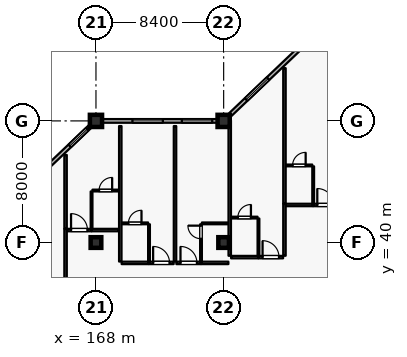
"""IFC4 building model, lengths in metres.
Left out: names, types, materials, properties, quantities, classifications, styles, units other than length and angle.
Written with IfcOpenShell. Run it as: python <this file> out.ifc"""

import sys

from ifc_helpers import new_model, si_unit, direction, frame, frame_2d, origin, origin_2d, place, context, subcontext, project, spatial, rectangle, extrude, element, fill, save


model = new_model("IFC4")
c1 = context("Model", 3, precision=1e-05, world=origin(), true_north=direction((0.0, 1.0)))
c2 = subcontext(c1, "Body", "Model", "MODEL_VIEW")
j1 = project(units=[si_unit("LENGTHUNIT", "METRE"), si_unit("PLANEANGLEUNIT", "RADIAN")], contexts=[c1])
p1 = place(None, origin())
s1 = spatial("IfcSite", under=j1, at=p1, CompositionType="ELEMENT")
p2 = place(p1, origin())
s2 = spatial("IfcBuilding", under=s1, at=p2, CompositionType="ELEMENT")
p3 = place(p2, frame((0.0, 0.0, 25.2)))
s3 = spatial("IfcBuildingStorey", under=s2, at=p3, CompositionType="ELEMENT", Elevation=25.2)
for number, where, z_axis, x_axis in (
    (1, (168.0, 48.0, 0.0), (0.0, 0.0, 1.0), (1.0, 0.0, 0.0)),
    (2, (176.4, 48.0, 0.0), (0.0, 0.0, 1.0), (1.0, 0.0, 0.0)),
):
    element("IfcColumn", number, at=place(p3, frame(where, z_axis=z_axis, x_axis=x_axis)), inside=s3, PredefinedType="COLUMN", context=c2, shape_type="SweptSolid", body=[
        extrude(rectangle(XDim=0.8, YDim=0.8, at=origin_2d()), origin(), (0.0, 0.0, 1.0), 3.6),
    ])
for number, where, z_axis, x_axis in (
    (3, (168.0, 40.0, 0.0), (0.0, 0.0, 1.0), (1.0, 0.0, 0.0)),
    (4, (176.4, 40.0, 0.0), (0.0, 0.0, 1.0), (1.0, 0.0, 0.0)),
):
    element("IfcColumn", number, at=place(p3, frame(where, z_axis=z_axis, x_axis=x_axis)), inside=s3, PredefinedType="COLUMN", context=c2, shape_type="SweptSolid", body=[
        extrude(rectangle(XDim=0.7, YDim=0.7, at=origin_2d()), origin(), (0.0, 0.0, 1.0), 3.6),
    ])
p4 = place(p3, frame((160.0, 40.381, 0.0), z_axis=(0.0, 0.0, 1.0), x_axis=(0.724156739794, 0.689635422677, 0.0)))
e5 = element("IfcWall", 5, at=p4, inside=s3, PredefinedType="SOLIDWALL", context=c2, shape_type="SweptSolid", body=[
    extrude(rectangle(XDim=10.495, YDim=0.24, at=frame_2d((5.248, 0.0))), origin(), (0.0, 0.0, 1.0), 2.93),
])
p5 = place(p4, frame((0.926, 0.0, 0.8)))
e6 = element("IfcOpeningElement", 6, at=p5, cuts=e5, PredefinedType="OPENING", context=c2, shape_type="SweptSolid", body=[
    extrude(rectangle(XDim=1.6, YDim=1.6, at=frame_2d((0.8, 0.8))), frame((0.0, 0.13, 0.0), z_axis=(0.0, -1.0, 0.0), x_axis=(1.0, 0.0, 0.0)), (0.0, 0.0, 1.0), 0.26),
])
p6 = place(p4, frame((5.138, 0.0, 0.8)))
e7 = element("IfcOpeningElement", 7, at=p6, cuts=e5, PredefinedType="OPENING", context=c2, shape_type="SweptSolid", body=[
    extrude(rectangle(XDim=1.6, YDim=1.6, at=frame_2d((0.8, 0.8))), frame((0.0, 0.13, 0.0), z_axis=(0.0, -1.0, 0.0), x_axis=(1.0, 0.0, 0.0)), (0.0, 0.0, 1.0), 0.26),
])
p7 = place(p4, frame((8.659, 0.0, 0.8)))
e8 = element("IfcOpeningElement", 8, at=p7, cuts=e5, PredefinedType="OPENING", context=c2, shape_type="SweptSolid", body=[
    extrude(rectangle(XDim=1.6, YDim=1.6, at=frame_2d((0.8, 0.8))), frame((0.0, 0.13, 0.0), z_axis=(0.0, -1.0, 0.0), x_axis=(1.0, 0.0, 0.0)), (0.0, 0.0, 1.0), 0.26),
])
p8 = place(p3, frame((168.4, 48.0, 0.0), z_axis=(0.0, 0.0, 1.0), x_axis=(1.0, 0.0, 0.0)))
e9 = element("IfcWall", 9, at=p8, inside=s3, PredefinedType="SOLIDWALL", context=c2, shape_type="SweptSolid", body=[
    extrude(rectangle(XDim=7.6, YDim=0.24, at=frame_2d((3.8, 0.0))), origin(), (0.0, 0.0, 1.0), 2.89),
])
p9 = place(p8, frame((2.0, 0.0, 0.8)))
e10 = element("IfcOpeningElement", 10, at=p9, cuts=e9, PredefinedType="OPENING", context=c2, shape_type="SweptSolid", body=[
    extrude(rectangle(XDim=2.0, YDim=1.75, at=frame_2d((1.0, 0.875))), frame((0.0, 0.13, 0.0), z_axis=(0.0, -1.0, 0.0), x_axis=(1.0, 0.0, 0.0)), (0.0, 0.0, 1.0), 0.26),
])
p10 = place(p8, frame((5.25, 0.0, 0.8)))
e11 = element("IfcOpeningElement", 11, at=p10, cuts=e9, PredefinedType="OPENING", context=c2, shape_type="SweptSolid", body=[
    extrude(rectangle(XDim=2.0, YDim=1.75, at=frame_2d((1.0, 0.875))), frame((0.0, 0.13, 0.0), z_axis=(0.0, -1.0, 0.0), x_axis=(1.0, 0.0, 0.0)), (0.0, 0.0, 1.0), 0.26),
])
p11 = place(p3, frame((176.8, 48.381, 0.0), z_axis=(0.0, 0.0, 1.0), x_axis=(0.724145676014, 0.689647040094, 0.0)))
e12 = element("IfcWall", 12, at=p11, inside=s3, PredefinedType="SOLIDWALL", context=c2, shape_type="SweptSolid", body=[
    extrude(rectangle(XDim=10.495, YDim=0.24, at=frame_2d((5.248, 0.0))), origin(), (0.0, 0.0, 1.0), 2.89),
])
p12 = place(p11, frame((1.486, 0.0, 0.8)))
e13 = element("IfcOpeningElement", 13, at=p12, cuts=e12, PredefinedType="OPENING", context=c2, shape_type="SweptSolid", body=[
    extrude(rectangle(XDim=2.0, YDim=1.75, at=frame_2d((1.0, 0.875))), frame((0.0, 0.13, 0.0), z_axis=(0.0, -1.0, 0.0), x_axis=(1.0, 0.0, 0.0)), (0.0, 0.0, 1.0), 0.26),
])
p13 = place(p11, frame((6.457, 0.0, 0.8)))
e14 = element("IfcOpeningElement", 14, at=p13, cuts=e12, PredefinedType="OPENING", context=c2, shape_type="SweptSolid", body=[
    extrude(rectangle(XDim=2.0, YDim=1.75, at=frame_2d((1.0, 0.875))), frame((0.0, 0.13, 0.0), z_axis=(0.0, -1.0, 0.0), x_axis=(1.0, 0.0, 0.0)), (0.0, 0.0, 1.0), 0.26),
])
p14 = place(p3, frame((166.0, 32.26, 0.0), z_axis=(0.0, 0.0, 1.0), x_axis=(0.0, 1.0, 0.0)))
e15 = element("IfcWall", 15, at=p14, inside=s3, PredefinedType="PARTITIONING", context=c2, shape_type="SweptSolid", body=[
    extrude(rectangle(XDim=8.64, YDim=0.16, at=frame_2d((4.32, 0.0))), origin(), (0.0, 0.0, 1.0), 3.335),
])
p15 = place(p3, frame((166.09, 40.82, 0.0), z_axis=(0.0, 0.0, 1.0), x_axis=(1.0, 0.0, 0.0)))
e16 = element("IfcWall", 16, at=p15, inside=s3, PredefinedType="PARTITIONING", context=c2, shape_type="SweptSolid", body=[
    extrude(rectangle(XDim=1.62, YDim=0.16, at=frame_2d((0.81, 0.0))), origin(), (0.0, 0.0, 1.0), 3.335),
])
p16 = place(p15, frame((0.27, 0.0, 0.0)))
e17 = element("IfcOpeningElement", 17, at=p16, cuts=e16, PredefinedType="OPENING", context=c2, shape_type="SweptSolid", body=[
    extrude(rectangle(XDim=1.08, YDim=2.3, at=frame_2d((0.54, 1.15))), frame((0.0, 0.09, 0.0), z_axis=(0.0, -1.0, 0.0), x_axis=(1.0, 0.0, 0.0)), (0.0, 0.0, 1.0), 0.18),
])
p17 = place(p3, frame((167.72, 40.82, 0.0), z_axis=(0.0, 0.0, 1.0), x_axis=(1.0, 0.0, 0.0)))
e18 = element("IfcWall", 18, at=p17, inside=s3, PredefinedType="PARTITIONING", context=c2, shape_type="SweptSolid", body=[
    extrude(rectangle(XDim=1.79, YDim=0.16, at=frame_2d((0.895, 0.0))), origin(), (0.0, 0.0, 1.0), 3.335),
])
p18 = place(p3, frame((167.71, 40.91, 0.0), z_axis=(0.0, 0.0, 1.0), x_axis=(0.0, 1.0, 0.0)))
e19 = element("IfcWall", 19, at=p18, inside=s3, PredefinedType="PARTITIONING", context=c2, shape_type="SweptSolid", body=[
    extrude(rectangle(XDim=2.45, YDim=0.115, at=frame_2d((1.225, 0.0))), origin(), (0.0, 0.0, 1.0), 3.335),
])
p19 = place(p3, frame((167.77, 43.42, 0.0), z_axis=(0.0, 0.0, 1.0), x_axis=(1.0, 0.0, 0.0)))
e20 = element("IfcWall", 20, at=p19, inside=s3, PredefinedType="PARTITIONING", context=c2, shape_type="SweptSolid", body=[
    extrude(rectangle(XDim=1.73, YDim=0.115, at=frame_2d((0.865, 0.0))), origin(), (0.0, 0.0, 1.0), 3.335),
])
p20 = place(p19, frame((0.435, 0.0, 0.0)))
e21 = element("IfcOpeningElement", 21, at=p20, cuts=e20, PredefinedType="OPENING", context=c2, shape_type="SweptSolid", body=[
    extrude(rectangle(XDim=0.86, YDim=2.12, at=frame_2d((0.43, 1.06))), frame((0.0, 0.067, 0.0), z_axis=(0.0, -1.0, 0.0), x_axis=(1.0, 0.0, 0.0)), (0.0, 0.0, 1.0), 0.135),
])
p21 = place(p3, frame((166.0, 40.91, 0.0), z_axis=(0.0, 0.0, 1.0), x_axis=(0.0, 1.0, 0.0)))
e22 = element("IfcWall", 22, at=p21, inside=s3, PredefinedType="PARTITIONING", context=c2, shape_type="SweptSolid", body=[
    extrude(rectangle(XDim=4.85, YDim=0.16, at=frame_2d((2.425, 0.0))), origin(), (0.0, 0.0, 1.0), 3.335),
])
p22 = place(p3, frame((169.69, 38.66, 0.0), z_axis=(0.0, 0.0, 1.0), x_axis=(1.0, 0.0, 0.0)))
e23 = element("IfcWall", 23, at=p22, inside=s3, PredefinedType="PARTITIONING", context=c2, shape_type="SweptSolid", body=[
    extrude(rectangle(XDim=1.79, YDim=0.16, at=frame_2d((0.895, 0.0))), origin(), (0.0, 0.0, 1.0), 3.335),
])
p23 = place(p3, frame((171.49, 38.66, 0.0), z_axis=(0.0, 0.0, 1.0), x_axis=(1.0, 0.0, 0.0)))
e24 = element("IfcWall", 24, at=p23, inside=s3, PredefinedType="PARTITIONING", context=c2, shape_type="SweptSolid", body=[
    extrude(rectangle(XDim=1.62, YDim=0.16, at=frame_2d((0.81, 0.0))), origin(), (0.0, 0.0, 1.0), 3.335),
])
p24 = place(p23, frame((0.27, 0.0, 0.0)))
e25 = element("IfcOpeningElement", 25, at=p24, cuts=e24, PredefinedType="OPENING", context=c2, shape_type="SweptSolid", body=[
    extrude(rectangle(XDim=1.08, YDim=2.3, at=frame_2d((0.54, 1.15))), frame((0.0, 0.09, 0.0), z_axis=(0.0, -1.0, 0.0), x_axis=(1.0, 0.0, 0.0)), (0.0, 0.0, 1.0), 0.18),
])
p25 = place(p3, frame((171.49, 38.75, 0.0), z_axis=(0.0, 0.0, 1.0), x_axis=(0.0, 1.0, 0.0)))
e26 = element("IfcWall", 26, at=p25, inside=s3, PredefinedType="PARTITIONING", context=c2, shape_type="SweptSolid", body=[
    extrude(rectangle(XDim=2.45, YDim=0.115, at=frame_2d((1.225, 0.0))), origin(), (0.0, 0.0, 1.0), 3.335),
])
p26 = place(p3, frame((169.7, 41.26, 0.0), z_axis=(0.0, 0.0, 1.0), x_axis=(1.0, 0.0, 0.0)))
e27 = element("IfcWall", 27, at=p26, inside=s3, PredefinedType="PARTITIONING", context=c2, shape_type="SweptSolid", body=[
    extrude(rectangle(XDim=1.73, YDim=0.115, at=frame_2d((0.865, 0.0))), origin(), (0.0, 0.0, 1.0), 3.335),
])
p27 = place(p26, frame((0.435, 0.0, 0.0)))
e28 = element("IfcOpeningElement", 28, at=p27, cuts=e27, PredefinedType="OPENING", context=c2, shape_type="SweptSolid", body=[
    extrude(rectangle(XDim=0.86, YDim=2.12, at=frame_2d((0.43, 1.06))), frame((0.0, 0.067, 0.0), z_axis=(0.0, -1.0, 0.0), x_axis=(1.0, 0.0, 0.0)), (0.0, 0.0, 1.0), 0.135),
])
p28 = place(p3, frame((169.6, 38.75, 0.0), z_axis=(0.0, 0.0, 1.0), x_axis=(0.0, 1.0, 0.0)))
e29 = element("IfcWall", 29, at=p28, inside=s3, PredefinedType="PARTITIONING", context=c2, shape_type="SweptSolid", body=[
    extrude(rectangle(XDim=8.91, YDim=0.16, at=frame_2d((4.455, 0.0))), origin(), (0.0, 0.0, 1.0), 3.335),
])
p29 = place(p3, frame((173.29, 38.66, 0.0), z_axis=(0.0, 0.0, 1.0), x_axis=(1.0, 0.0, 0.0)))
e30 = element("IfcWall", 30, at=p29, inside=s3, PredefinedType="PARTITIONING", context=c2, shape_type="SweptSolid", body=[
    extrude(rectangle(XDim=1.62, YDim=0.16, at=frame_2d((0.81, 0.0))), origin(), (0.0, 0.0, 1.0), 3.335),
])
p30 = place(p29, frame((0.27, 0.0, 0.0)))
e31 = element("IfcOpeningElement", 31, at=p30, cuts=e30, PredefinedType="OPENING", context=c2, shape_type="SweptSolid", body=[
    extrude(rectangle(XDim=1.08, YDim=2.3, at=frame_2d((0.54, 1.15))), frame((0.0, 0.09, 0.0), z_axis=(0.0, -1.0, 0.0), x_axis=(1.0, 0.0, 0.0)), (0.0, 0.0, 1.0), 0.18),
])
p31 = place(p3, frame((174.92, 38.66, 0.0), z_axis=(0.0, 0.0, 1.0), x_axis=(1.0, 0.0, 0.0)))
e32 = element("IfcWall", 32, at=p31, inside=s3, PredefinedType="PARTITIONING", context=c2, shape_type="SweptSolid", body=[
    extrude(rectangle(XDim=1.79, YDim=0.16, at=frame_2d((0.895, 0.0))), origin(), (0.0, 0.0, 1.0), 3.335),
])
p32 = place(p3, frame((174.91, 38.75, 0.0), z_axis=(0.0, 0.0, 1.0), x_axis=(0.0, 1.0, 0.0)))
e33 = element("IfcWall", 33, at=p32, inside=s3, PredefinedType="PARTITIONING", context=c2, shape_type="SweptSolid", body=[
    extrude(rectangle(XDim=2.45, YDim=0.115, at=frame_2d((1.225, 0.0))), origin(), (0.0, 0.0, 1.0), 3.335),
])
p33 = place(p32, frame((1.5, 0.0, 0.0)))
e34 = element("IfcOpeningElement", 34, at=p33, cuts=e33, PredefinedType="OPENING", context=c2, shape_type="SweptSolid", body=[
    extrude(rectangle(XDim=0.86, YDim=2.12, at=frame_2d((0.43, 1.06))), frame((0.0, 0.067, 0.0), z_axis=(0.0, -1.0, 0.0), x_axis=(1.0, 0.0, 0.0)), (0.0, 0.0, 1.0), 0.135),
])
p34 = place(p3, frame((174.97, 41.26, 0.0), z_axis=(0.0, 0.0, 1.0), x_axis=(1.0, 0.0, 0.0)))
e35 = element("IfcWall", 35, at=p34, inside=s3, PredefinedType="PARTITIONING", context=c2, shape_type="SweptSolid", body=[
    extrude(rectangle(XDim=1.73, YDim=0.115, at=frame_2d((0.865, 0.0))), origin(), (0.0, 0.0, 1.0), 3.335),
])
p35 = place(p3, frame((173.2, 38.75, 0.0), z_axis=(0.0, 0.0, 1.0), x_axis=(0.0, 1.0, 0.0)))
e36 = element("IfcWall", 36, at=p35, inside=s3, PredefinedType="PARTITIONING", context=c2, shape_type="SweptSolid", body=[
    extrude(rectangle(XDim=8.91, YDim=0.16, at=frame_2d((4.455, 0.0))), origin(), (0.0, 0.0, 1.0), 3.335),
])
p36 = place(p3, frame((176.89, 39.04, 0.0), z_axis=(0.0, 0.0, 1.0), x_axis=(1.0, 0.0, 0.0)))
e37 = element("IfcWall", 37, at=p36, inside=s3, PredefinedType="PARTITIONING", context=c2, shape_type="SweptSolid", body=[
    extrude(rectangle(XDim=1.79, YDim=0.16, at=frame_2d((0.895, 0.0))), origin(), (0.0, 0.0, 1.0), 3.335),
])
p37 = place(p3, frame((178.69, 39.04, 0.0), z_axis=(0.0, 0.0, 1.0), x_axis=(1.0, 0.0, 0.0)))
e38 = element("IfcWall", 38, at=p37, inside=s3, PredefinedType="PARTITIONING", context=c2, shape_type="SweptSolid", body=[
    extrude(rectangle(XDim=1.62, YDim=0.16, at=frame_2d((0.81, 0.0))), origin(), (0.0, 0.0, 1.0), 3.335),
])
p38 = place(p37, frame((0.27, 0.0, 0.0)))
e39 = element("IfcOpeningElement", 39, at=p38, cuts=e38, PredefinedType="OPENING", context=c2, shape_type="SweptSolid", body=[
    extrude(rectangle(XDim=1.08, YDim=2.3, at=frame_2d((0.54, 1.15))), frame((0.0, 0.09, 0.0), z_axis=(0.0, -1.0, 0.0), x_axis=(1.0, 0.0, 0.0)), (0.0, 0.0, 1.0), 0.18),
])
p39 = place(p3, frame((178.69, 39.13, 0.0), z_axis=(0.0, 0.0, 1.0), x_axis=(0.0, 1.0, 0.0)))
e40 = element("IfcWall", 40, at=p39, inside=s3, PredefinedType="PARTITIONING", context=c2, shape_type="SweptSolid", body=[
    extrude(rectangle(XDim=2.45, YDim=0.115, at=frame_2d((1.225, 0.0))), origin(), (0.0, 0.0, 1.0), 3.335),
])
p40 = place(p3, frame((176.9, 41.64, 0.0), z_axis=(0.0, 0.0, 1.0), x_axis=(1.0, 0.0, 0.0)))
e41 = element("IfcWall", 41, at=p40, inside=s3, PredefinedType="PARTITIONING", context=c2, shape_type="SweptSolid", body=[
    extrude(rectangle(XDim=1.73, YDim=0.115, at=frame_2d((0.865, 0.0))), origin(), (0.0, 0.0, 1.0), 3.335),
])
p41 = place(p40, frame((0.435, 0.0, 0.0)))
e42 = element("IfcOpeningElement", 42, at=p41, cuts=e41, PredefinedType="OPENING", context=c2, shape_type="SweptSolid", body=[
    extrude(rectangle(XDim=0.86, YDim=2.12, at=frame_2d((0.43, 1.06))), frame((0.0, 0.067, 0.0), z_axis=(0.0, -1.0, 0.0), x_axis=(1.0, 0.0, 0.0)), (0.0, 0.0, 1.0), 0.135),
])
p42 = place(p3, frame((176.8, 39.13, 0.0), z_axis=(0.0, 0.0, 1.0), x_axis=(0.0, 1.0, 0.0)))
e43 = element("IfcWall", 43, at=p42, inside=s3, PredefinedType="PARTITIONING", context=c2, shape_type="SweptSolid", body=[
    extrude(rectangle(XDim=8.91, YDim=0.16, at=frame_2d((4.455, 0.0))), origin(), (0.0, 0.0, 1.0), 3.335),
])
p43 = place(p3, frame((180.4, 39.13, 0.0), z_axis=(0.0, 0.0, 1.0), x_axis=(0.0, 1.0, 0.0)))
e44 = element("IfcWall", 44, at=p43, inside=s3, PredefinedType="PARTITIONING", context=c2, shape_type="SweptSolid", body=[
    extrude(rectangle(XDim=3.42, YDim=0.16, at=frame_2d((1.71, 0.0))), origin(), (0.0, 0.0, 1.0), 3.335),
])
p44 = place(p3, frame((180.49, 42.47, 0.0), z_axis=(0.0, 0.0, 1.0), x_axis=(1.0, 0.0, 0.0)))
e45 = element("IfcWall", 45, at=p44, inside=s3, PredefinedType="PARTITIONING", context=c2, shape_type="SweptSolid", body=[
    extrude(rectangle(XDim=1.79, YDim=0.16, at=frame_2d((0.895, 0.0))), origin(), (0.0, 0.0, 1.0), 3.335),
])
p45 = place(p3, frame((182.29, 42.47, 0.0), z_axis=(0.0, 0.0, 1.0), x_axis=(1.0, 0.0, 0.0)))
e46 = element("IfcWall", 46, at=p45, inside=s3, PredefinedType="PARTITIONING", context=c2, shape_type="SweptSolid", body=[
    extrude(rectangle(XDim=1.62, YDim=0.16, at=frame_2d((0.81, 0.0))), origin(), (0.0, 0.0, 1.0), 3.335),
])
p46 = place(p45, frame((0.27, 0.0, 0.0)))
e47 = element("IfcOpeningElement", 47, at=p46, cuts=e46, PredefinedType="OPENING", context=c2, shape_type="SweptSolid", body=[
    extrude(rectangle(XDim=1.08, YDim=2.3, at=frame_2d((0.54, 1.15))), frame((0.0, 0.09, 0.0), z_axis=(0.0, -1.0, 0.0), x_axis=(1.0, 0.0, 0.0)), (0.0, 0.0, 1.0), 0.18),
])
p47 = place(p3, frame((182.29, 42.56, 0.0), z_axis=(0.0, 0.0, 1.0), x_axis=(0.0, 1.0, 0.0)))
e48 = element("IfcWall", 48, at=p47, inside=s3, PredefinedType="PARTITIONING", context=c2, shape_type="SweptSolid", body=[
    extrude(rectangle(XDim=2.45, YDim=0.115, at=frame_2d((1.225, 0.0))), origin(), (0.0, 0.0, 1.0), 3.335),
])
p48 = place(p3, frame((180.5, 45.07, 0.0), z_axis=(0.0, 0.0, 1.0), x_axis=(1.0, 0.0, 0.0)))
e49 = element("IfcWall", 49, at=p48, inside=s3, PredefinedType="PARTITIONING", context=c2, shape_type="SweptSolid", body=[
    extrude(rectangle(XDim=1.73, YDim=0.115, at=frame_2d((0.865, 0.0))), origin(), (0.0, 0.0, 1.0), 3.335),
])
p49 = place(p48, frame((0.435, 0.0, 0.0)))
e50 = element("IfcOpeningElement", 50, at=p49, cuts=e49, PredefinedType="OPENING", context=c2, shape_type="SweptSolid", body=[
    extrude(rectangle(XDim=0.86, YDim=2.12, at=frame_2d((0.43, 1.06))), frame((0.0, 0.067, 0.0), z_axis=(0.0, -1.0, 0.0), x_axis=(1.0, 0.0, 0.0)), (0.0, 0.0, 1.0), 0.135),
])
p50 = place(p3, frame((180.4, 42.56, 0.0), z_axis=(0.0, 0.0, 1.0), x_axis=(0.0, 1.0, 0.0)))
e51 = element("IfcWall", 51, at=p50, inside=s3, PredefinedType="PARTITIONING", context=c2, shape_type="SweptSolid", body=[
    extrude(rectangle(XDim=8.91, YDim=0.16, at=frame_2d((4.455, 0.0))), origin(), (0.0, 0.0, 1.0), 3.335),
])
p51 = place(p7, origin())
e52 = element("IfcWindow", 52, at=p51, inside=s3, PartitioningType="SINGLE_PANEL", PredefinedType="WINDOW", context=c2, shape_type="SweptSolid", body=[
    extrude(rectangle(XDim=1.6, YDim=1.6, at=frame_2d((0.8, 0.8))), frame((0.0, 0.03, 0.0), z_axis=(0.0, -1.0, 0.0), x_axis=(1.0, 0.0, 0.0)), (0.0, 0.0, 1.0), 0.06),
])
fill(e8, e52)
p52 = place(p9, origin())
e53 = element("IfcWindow", 53, at=p52, inside=s3, PartitioningType="DOUBLE_PANEL_VERTICAL", PredefinedType="WINDOW", context=c2, shape_type="SweptSolid", body=[
    extrude(rectangle(XDim=2.0, YDim=1.75, at=frame_2d((1.0, 0.875))), frame((0.0, 0.03, 0.0), z_axis=(0.0, -1.0, 0.0), x_axis=(1.0, 0.0, 0.0)), (0.0, 0.0, 1.0), 0.06),
])
fill(e10, e53)
p53 = place(p10, origin())
e54 = element("IfcWindow", 54, at=p53, inside=s3, PartitioningType="DOUBLE_PANEL_VERTICAL", PredefinedType="WINDOW", context=c2, shape_type="SweptSolid", body=[
    extrude(rectangle(XDim=2.0, YDim=1.75, at=frame_2d((1.0, 0.875))), frame((0.0, 0.03, 0.0), z_axis=(0.0, -1.0, 0.0), x_axis=(1.0, 0.0, 0.0)), (0.0, 0.0, 1.0), 0.06),
])
fill(e11, e54)
p54 = place(p12, origin())
e55 = element("IfcWindow", 55, at=p54, inside=s3, PartitioningType="DOUBLE_PANEL_VERTICAL", PredefinedType="WINDOW", context=c2, shape_type="SweptSolid", body=[
    extrude(rectangle(XDim=2.0, YDim=1.75, at=frame_2d((1.0, 0.875))), frame((0.0, 0.03, 0.0), z_axis=(0.0, -1.0, 0.0), x_axis=(1.0, 0.0, 0.0)), (0.0, 0.0, 1.0), 0.06),
])
fill(e13, e55)
p55 = place(p16, origin())
e56 = element("IfcDoor", 56, at=p55, inside=s3, OperationType="SINGLE_SWING_LEFT", PredefinedType="DOOR", context=c2, shape_type="SweptSolid", body=[
    extrude(rectangle(XDim=1.08, YDim=2.3, at=frame_2d((0.54, 1.15))), frame((0.0, 0.025, 0.0), z_axis=(0.0, -1.0, 0.0), x_axis=(1.0, 0.0, 0.0)), (0.0, 0.0, 1.0), 0.05),
])
fill(e17, e56)
p56 = place(p20, origin())
e57 = element("IfcDoor", 57, at=p56, inside=s3, OperationType="SINGLE_SWING_RIGHT", PredefinedType="DOOR", context=c2, shape_type="SweptSolid", body=[
    extrude(rectangle(XDim=0.86, YDim=2.12, at=frame_2d((0.43, 1.06))), frame((0.0, 0.025, 0.0), z_axis=(0.0, -1.0, 0.0), x_axis=(1.0, 0.0, 0.0)), (0.0, 0.0, 1.0), 0.05),
])
fill(e21, e57)
p57 = place(p24, origin())
e58 = element("IfcDoor", 58, at=p57, inside=s3, OperationType="SINGLE_SWING_LEFT", PredefinedType="DOOR", context=c2, shape_type="SweptSolid", body=[
    extrude(rectangle(XDim=1.08, YDim=2.3, at=frame_2d((0.54, 1.15))), frame((0.0, 0.025, 0.0), z_axis=(0.0, -1.0, 0.0), x_axis=(1.0, 0.0, 0.0)), (0.0, 0.0, 1.0), 0.05),
])
fill(e25, e58)
p58 = place(p27, origin())
e59 = element("IfcDoor", 59, at=p58, inside=s3, OperationType="SINGLE_SWING_RIGHT", PredefinedType="DOOR", context=c2, shape_type="SweptSolid", body=[
    extrude(rectangle(XDim=0.86, YDim=2.12, at=frame_2d((0.43, 1.06))), frame((0.0, 0.025, 0.0), z_axis=(0.0, -1.0, 0.0), x_axis=(1.0, 0.0, 0.0)), (0.0, 0.0, 1.0), 0.05),
])
fill(e28, e59)
p59 = place(p30, origin())
e60 = element("IfcDoor", 60, at=p59, inside=s3, OperationType="SINGLE_SWING_LEFT", PredefinedType="DOOR", context=c2, shape_type="SweptSolid", body=[
    extrude(rectangle(XDim=1.08, YDim=2.3, at=frame_2d((0.54, 1.15))), frame((0.0, 0.025, 0.0), z_axis=(0.0, -1.0, 0.0), x_axis=(1.0, 0.0, 0.0)), (0.0, 0.0, 1.0), 0.05),
])
fill(e31, e60)
p60 = place(p33, origin())
e61 = element("IfcDoor", 61, at=p60, inside=s3, OperationType="SINGLE_SWING_RIGHT", PredefinedType="DOOR", context=c2, shape_type="SweptSolid", body=[
    extrude(rectangle(XDim=0.86, YDim=2.12, at=frame_2d((0.43, 1.06))), frame((0.0, 0.025, 0.0), z_axis=(0.0, -1.0, 0.0), x_axis=(1.0, 0.0, 0.0)), (0.0, 0.0, 1.0), 0.05),
])
fill(e34, e61)
p61 = place(p38, origin())
e62 = element("IfcDoor", 62, at=p61, inside=s3, OperationType="SINGLE_SWING_LEFT", PredefinedType="DOOR", context=c2, shape_type="SweptSolid", body=[
    extrude(rectangle(XDim=1.08, YDim=2.3, at=frame_2d((0.54, 1.15))), frame((0.0, 0.025, 0.0), z_axis=(0.0, -1.0, 0.0), x_axis=(1.0, 0.0, 0.0)), (0.0, 0.0, 1.0), 0.05),
])
fill(e39, e62)
p62 = place(p41, origin())
e63 = element("IfcDoor", 63, at=p62, inside=s3, OperationType="SINGLE_SWING_RIGHT", PredefinedType="DOOR", context=c2, shape_type="SweptSolid", body=[
    extrude(rectangle(XDim=0.86, YDim=2.12, at=frame_2d((0.43, 1.06))), frame((0.0, 0.025, 0.0), z_axis=(0.0, -1.0, 0.0), x_axis=(1.0, 0.0, 0.0)), (0.0, 0.0, 1.0), 0.05),
])
fill(e42, e63)
p63 = place(p46, origin())
e64 = element("IfcDoor", 64, at=p63, inside=s3, OperationType="SINGLE_SWING_LEFT", PredefinedType="DOOR", context=c2, shape_type="SweptSolid", body=[
    extrude(rectangle(XDim=1.08, YDim=2.3, at=frame_2d((0.54, 1.15))), frame((0.0, 0.025, 0.0), z_axis=(0.0, -1.0, 0.0), x_axis=(1.0, 0.0, 0.0)), (0.0, 0.0, 1.0), 0.05),
])
fill(e47, e64)
p64 = place(p49, origin())
e65 = element("IfcDoor", 65, at=p64, inside=s3, OperationType="SINGLE_SWING_RIGHT", PredefinedType="DOOR", context=c2, shape_type="SweptSolid", body=[
    extrude(rectangle(XDim=0.86, YDim=2.12, at=frame_2d((0.43, 1.06))), frame((0.0, 0.025, 0.0), z_axis=(0.0, -1.0, 0.0), x_axis=(1.0, 0.0, 0.0)), (0.0, 0.0, 1.0), 0.05),
])
fill(e50, e65)
save(model, sys.argv[1])
